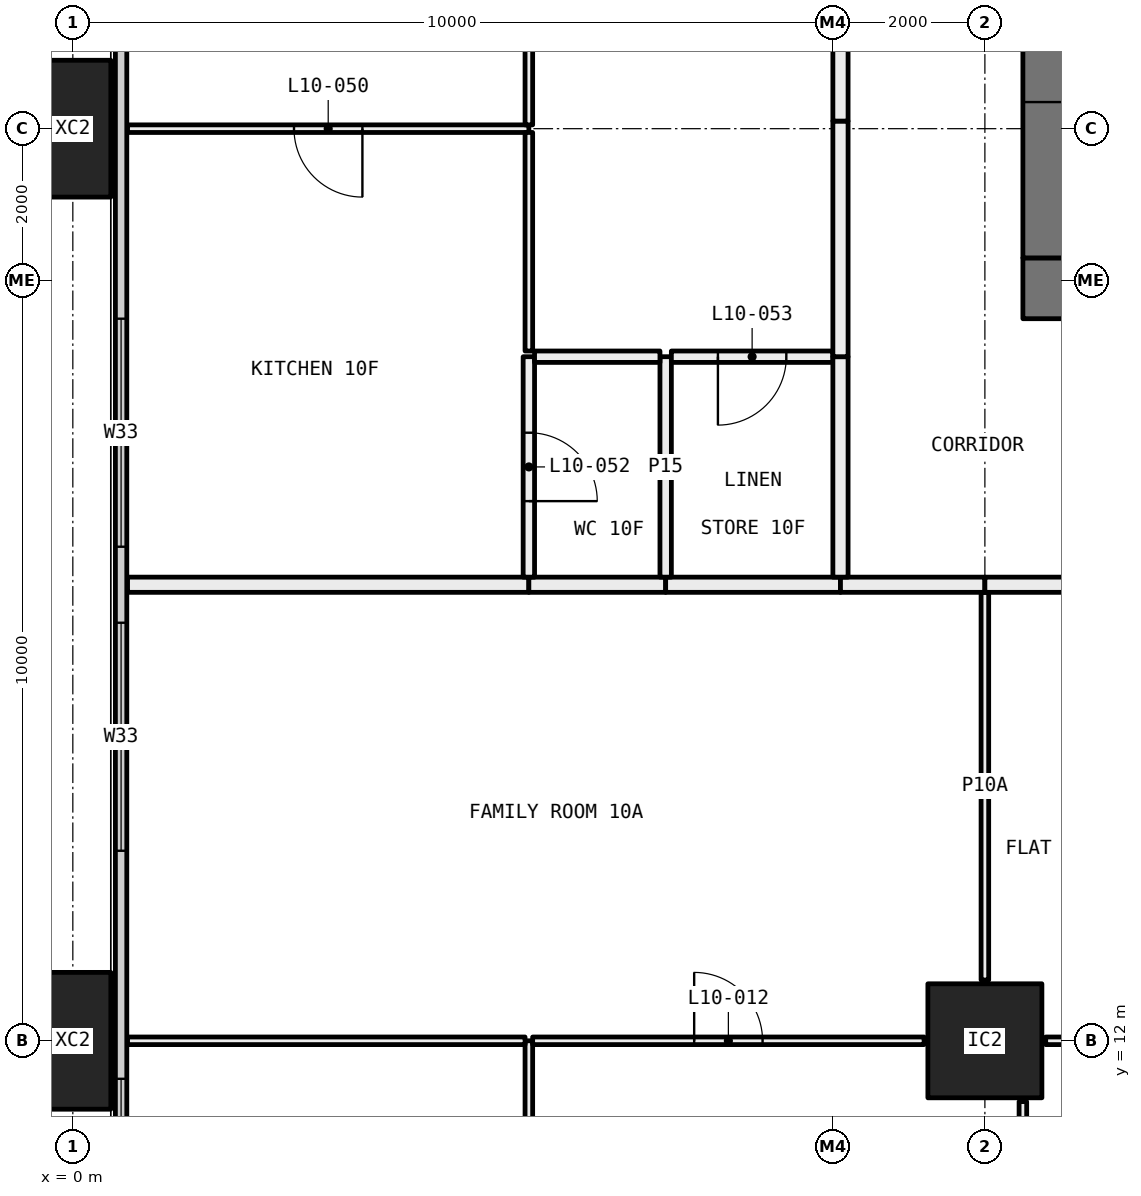
"""IFC4 building model, lengths in metres.
Left out: names, types, materials, properties, quantities, classifications, styles, units other than length and angle.
Written with IfcOpenShell. Run it as: python <this file> out.ifc"""

import sys

from ifc_helpers import new_model, si_unit, direction, frame, frame_2d, origin, origin_2d, place, context, subcontext, project, spatial, rectangle, hollow_rectangle, extrude, element, fill, save


model = new_model("IFC4")
c1 = context("Model", 3, precision=1e-05, world=origin(), true_north=direction((0.0, 1.0)))
c2 = subcontext(c1, "Body", "Model", "MODEL_VIEW")
j1 = project(units=[si_unit("LENGTHUNIT", "METRE"), si_unit("PLANEANGLEUNIT", "RADIAN")], contexts=[c1])
p1 = place(None, origin())
s1 = spatial("IfcSite", under=j1, at=p1, CompositionType="ELEMENT")
p2 = place(p1, origin())
s2 = spatial("IfcBuilding", under=s1, at=p2, CompositionType="ELEMENT")
p3 = place(p2, frame((0.0, 0.0, 47.25)))
s3 = spatial("IfcBuildingStorey", under=s2, at=p3, CompositionType="ELEMENT", Elevation=47.25)
for number, where, z_axis, x_axis in (
    (1, (0.0, 12.0, -0.4), (0.0, 0.0, 1.0), (0.0, 1.0, 0.0)),
    (2, (0.0, 24.0, -0.4), (0.0, 0.0, 1.0), (0.0, 1.0, 0.0)),
):
    element("IfcColumn", number, at=place(p3, frame(where, z_axis=z_axis, x_axis=x_axis)), inside=s3, PredefinedType="COLUMN", context=c2, shape_type="SweptSolid", body=[
        extrude(hollow_rectangle(XDim=1.8, YDim=1.0, WallThickness=0.07, at=origin_2d()), origin(), (0.0, 0.0, 1.0), 3.45),
    ])
p4 = place(p3, frame((12.0, 12.0, 0.0), z_axis=(0.0, 0.0, 1.0), x_axis=(1.0, 0.0, 0.0)))
e3 = element("IfcColumn", 3, at=p4, inside=s3, PredefinedType="COLUMN", context=c2, shape_type="SweptSolid", body=[
    extrude(hollow_rectangle(XDim=1.5, YDim=1.5, WallThickness=0.065, at=origin_2d()), origin(), (0.0, 0.0, 1.0), 3.05),
])
p5 = place(p3, frame((0.635, 6.71, 0.0), z_axis=(0.0, 0.0, 1.0), x_axis=(0.0, 1.0, 0.0)))
e4 = element("IfcWall", 4, at=p5, inside=s3, PredefinedType="ELEMENTEDWALL", context=c2, shape_type="SweptSolid", body=[
    extrude(rectangle(XDim=34.58, YDim=0.15, at=frame_2d((17.29, 0.0))), origin(), (0.0, 0.0, 1.0), 3.05),
])
p6 = place(p5, frame((0.29, 0.0, 0.45)))
e5 = element("IfcOpeningElement", 5, at=p6, cuts=e4, PredefinedType="OPENING", context=c2, shape_type="SweptSolid", body=[
    extrude(rectangle(XDim=4.5, YDim=2.55, at=frame_2d((2.25, 1.275))), frame((0.0, 0.085, 0.0), z_axis=(0.0, -1.0, 0.0), x_axis=(1.0, 0.0, 0.0)), (0.0, 0.0, 1.0), 0.17),
])
p7 = place(p5, frame((7.79, 0.0, 0.45)))
e6 = element("IfcOpeningElement", 6, at=p7, cuts=e4, PredefinedType="OPENING", context=c2, shape_type="SweptSolid", body=[
    extrude(rectangle(XDim=3.0, YDim=2.55, at=frame_2d((1.5, 1.275))), frame((0.0, 0.085, 0.0), z_axis=(0.0, -1.0, 0.0), x_axis=(1.0, 0.0, 0.0)), (0.0, 0.0, 1.0), 0.17),
])
p8 = place(p5, frame((11.79, 0.0, 0.45)))
e7 = element("IfcOpeningElement", 7, at=p8, cuts=e4, PredefinedType="OPENING", context=c2, shape_type="SweptSolid", body=[
    extrude(rectangle(XDim=3.0, YDim=2.55, at=frame_2d((1.5, 1.275))), frame((0.0, 0.085, 0.0), z_axis=(0.0, -1.0, 0.0), x_axis=(1.0, 0.0, 0.0)), (0.0, 0.0, 1.0), 0.17),
])
p9 = place(p5, frame((19.79, 0.0, 0.45)))
e8 = element("IfcOpeningElement", 8, at=p9, cuts=e4, PredefinedType="OPENING", context=c2, shape_type="SweptSolid", body=[
    extrude(rectangle(XDim=3.0, YDim=2.55, at=frame_2d((1.5, 1.275))), frame((0.0, 0.085, 0.0), z_axis=(0.0, -1.0, 0.0), x_axis=(1.0, 0.0, 0.0)), (0.0, 0.0, 1.0), 0.17),
])
p10 = place(p5, frame((23.79, 0.0, 0.45)))
e9 = element("IfcOpeningElement", 9, at=p10, cuts=e4, PredefinedType="OPENING", context=c2, shape_type="SweptSolid", body=[
    extrude(rectangle(XDim=2.0, YDim=2.55, at=frame_2d((1.0, 1.275))), frame((0.0, 0.085, 0.0), z_axis=(0.0, -1.0, 0.0), x_axis=(1.0, 0.0, 0.0)), (0.0, 0.0, 1.0), 0.17),
])
p11 = place(p5, frame((29.79, 0.0, 0.45)))
e10 = element("IfcOpeningElement", 10, at=p11, cuts=e4, PredefinedType="OPENING", context=c2, shape_type="SweptSolid", body=[
    extrude(rectangle(XDim=4.5, YDim=2.55, at=frame_2d((2.25, 1.275))), frame((0.0, 0.085, 0.0), z_axis=(0.0, -1.0, 0.0), x_axis=(1.0, 0.0, 0.0)), (0.0, 0.0, 1.0), 0.17),
])
p12 = place(p3, frame((6.0, 6.72, 0.0), z_axis=(0.0, 0.0, 1.0), x_axis=(0.0, 1.0, 0.0)))
e11 = element("IfcWall", 11, at=p12, inside=s3, PredefinedType="PARTITIONING", context=c2, shape_type="SweptSolid", body=[
    extrude(rectangle(XDim=5.28, YDim=0.1, at=frame_2d((2.64, 0.0))), origin(), (0.0, 0.0, 1.0), 2.45),
])
p13 = place(p12, frame((2.19, 0.0, 0.0)))
e12 = element("IfcOpeningElement", 12, at=p13, cuts=e11, PredefinedType="OPENING", context=c2, shape_type="SweptSolid", body=[
    extrude(rectangle(XDim=0.9, YDim=2.1, at=frame_2d((0.45, 1.05))), frame((0.0, 0.06, 0.0), z_axis=(0.0, -1.0, 0.0), x_axis=(1.0, 0.0, 0.0)), (0.0, 0.0, 1.0), 0.12),
])
p14 = place(p3, frame((5.95, 12.0, 0.0), z_axis=(0.0, 0.0, 1.0), x_axis=(-1.0, 0.0, 0.0)))
e13 = element("IfcWall", 13, at=p14, inside=s3, PredefinedType="PARTITIONING", context=c2, shape_type="SweptSolid", body=[
    extrude(rectangle(XDim=5.23, YDim=0.1, at=frame_2d((2.615, 0.0))), origin(), (0.0, 0.0, 1.0), 2.45),
])
p15 = place(p3, frame((12.5, 6.05, 0.0), z_axis=(0.0, 0.0, 1.0), x_axis=(0.0, 1.0, 0.0)))
e14 = element("IfcWall", 14, at=p15, inside=s3, PredefinedType="PARTITIONING", context=c2, shape_type="SweptSolid", body=[
    extrude(rectangle(XDim=5.15, YDim=0.1, at=frame_2d((2.575, 0.0))), origin(), (0.0, 0.0, 1.0), 3.05),
])
p16 = place(p15, frame((2.125, 0.0, 0.0)))
e15 = element("IfcOpeningElement", 15, at=p16, cuts=e14, PredefinedType="OPENING", context=c2, shape_type="SweptSolid", body=[
    extrude(rectangle(XDim=0.9, YDim=2.1, at=frame_2d((0.45, 1.05))), frame((0.0, 0.06, 0.0), z_axis=(0.0, -1.0, 0.0), x_axis=(1.0, 0.0, 0.0)), (0.0, 0.0, 1.0), 0.12),
])
p17 = place(p3, frame((11.2, 12.0, 0.0), z_axis=(0.0, 0.0, 1.0), x_axis=(-1.0, 0.0, 0.0)))
e16 = element("IfcWall", 16, at=p17, inside=s3, PredefinedType="PARTITIONING", context=c2, shape_type="SweptSolid", body=[
    extrude(rectangle(XDim=5.15, YDim=0.1, at=frame_2d((2.575, 0.0))), origin(), (0.0, 0.0, 1.0), 2.45),
])
p18 = place(p17, frame((2.125, 0.0, 0.0)))
e17 = element("IfcOpeningElement", 17, at=p18, cuts=e16, PredefinedType="OPENING", context=c2, shape_type="SweptSolid", body=[
    extrude(rectangle(XDim=0.9, YDim=2.1, at=frame_2d((0.45, 1.05))), frame((0.0, 0.06, 0.0), z_axis=(0.0, -1.0, 0.0), x_axis=(1.0, 0.0, 0.0)), (0.0, 0.0, 1.0), 0.12),
])
p19 = place(p3, frame((16.5, 12.0, 0.0), z_axis=(0.0, 0.0, 1.0), x_axis=(-1.0, 0.0, 0.0)))
e18 = element("IfcWall", 18, at=p19, inside=s3, PredefinedType="PARTITIONING", context=c2, shape_type="SweptSolid", body=[
    extrude(rectangle(XDim=3.7, YDim=0.1, at=frame_2d((1.85, 0.0))), origin(), (0.0, 0.0, 1.0), 2.45),
])
p20 = place(p19, frame((1.4, 0.0, 0.0)))
e19 = element("IfcOpeningElement", 19, at=p20, cuts=e18, PredefinedType="OPENING", context=c2, shape_type="SweptSolid", body=[
    extrude(rectangle(XDim=0.9, YDim=2.1, at=frame_2d((0.45, 1.05))), frame((0.0, 0.06, 0.0), z_axis=(0.0, -1.0, 0.0), x_axis=(1.0, 0.0, 0.0)), (0.0, 0.0, 1.0), 0.12),
])
p21 = place(p3, frame((12.0, 12.8, 0.0), z_axis=(0.0, 0.0, 1.0), x_axis=(0.0, 1.0, 0.0)))
e20 = element("IfcWall", 20, at=p21, inside=s3, PredefinedType="PARTITIONING", context=c2, shape_type="SweptSolid", body=[
    extrude(rectangle(XDim=5.1, YDim=0.1, at=frame_2d((2.55, 0.0))), origin(), (0.0, 0.0, 1.0), 3.05),
])
p22 = place(p3, frame((6.0, 18.0, 0.0), z_axis=(0.0, 0.0, 1.0), x_axis=(-1.0, 0.0, 0.0)))
e21 = element("IfcWall", 21, at=p22, inside=s3, PredefinedType="PARTITIONING", context=c2, shape_type="SweptSolid", body=[
    extrude(rectangle(XDim=5.28, YDim=0.2, at=frame_2d((2.64, 0.0))), origin(), (0.0, 0.0, 1.0), 3.05),
])
p23 = place(p3, frame((7.8, 18.0, 0.0), z_axis=(0.0, 0.0, 1.0), x_axis=(-1.0, 0.0, 0.0)))
e22 = element("IfcWall", 22, at=p23, inside=s3, PredefinedType="PARTITIONING", context=c2, shape_type="SweptSolid", body=[
    extrude(rectangle(XDim=1.8, YDim=0.2, at=frame_2d((0.9, 0.0))), origin(), (0.0, 0.0, 1.0), 3.05),
])
p24 = place(p3, frame((10.1, 18.0, 0.0), z_axis=(0.0, 0.0, 1.0), x_axis=(-1.0, 0.0, 0.0)))
e23 = element("IfcWall", 23, at=p24, inside=s3, PredefinedType="PARTITIONING", context=c2, shape_type="SweptSolid", body=[
    extrude(rectangle(XDim=2.3, YDim=0.2, at=frame_2d((1.15, 0.0))), origin(), (0.0, 0.0, 1.0), 3.05),
])
p25 = place(p3, frame((12.0, 18.0, 0.0), z_axis=(0.0, 0.0, 1.0), x_axis=(-1.0, 0.0, 0.0)))
e24 = element("IfcWall", 24, at=p25, inside=s3, PredefinedType="PARTITIONING", context=c2, shape_type="SweptSolid", body=[
    extrude(rectangle(XDim=1.9, YDim=0.2, at=frame_2d((0.95, 0.0))), origin(), (0.0, 0.0, 1.0), 3.05),
])
p26 = place(p3, frame((16.5, 18.0, 0.0), z_axis=(0.0, 0.0, 1.0), x_axis=(-1.0, 0.0, 0.0)))
e25 = element("IfcWall", 25, at=p26, inside=s3, PredefinedType="PARTITIONING", context=c2, shape_type="SweptSolid", body=[
    extrude(rectangle(XDim=4.5, YDim=0.2, at=frame_2d((2.25, 0.0))), origin(), (0.0, 0.0, 1.0), 3.05),
])
p27 = place(p26, frame((1.75, 0.0, 0.0)))
e26 = element("IfcOpeningElement", 26, at=p27, cuts=e25, PredefinedType="OPENING", context=c2, shape_type="SweptSolid", body=[
    extrude(rectangle(XDim=1.0, YDim=2.1, at=frame_2d((0.5, 1.05))), frame((0.0, 0.11, 0.0), z_axis=(0.0, -1.0, 0.0), x_axis=(1.0, 0.0, 0.0)), (0.0, 0.0, 1.0), 0.22),
])
p28 = place(p3, frame((6.0, 24.0, 0.0), z_axis=(0.0, 0.0, 1.0), x_axis=(-1.0, 0.0, 0.0)))
e27 = element("IfcWall", 27, at=p28, inside=s3, PredefinedType="PARTITIONING", context=c2, shape_type="SweptSolid", body=[
    extrude(rectangle(XDim=5.28, YDim=0.1, at=frame_2d((2.64, 0.0))), origin(), (0.0, 0.0, 1.0), 2.45),
])
p29 = place(p28, frame((2.19, 0.0, 0.0)))
e28 = element("IfcOpeningElement", 28, at=p29, cuts=e27, PredefinedType="OPENING", context=c2, shape_type="SweptSolid", body=[
    extrude(rectangle(XDim=0.9, YDim=2.1, at=frame_2d((0.45, 1.05))), frame((0.0, 0.06, 0.0), z_axis=(0.0, -1.0, 0.0), x_axis=(1.0, 0.0, 0.0)), (0.0, 0.0, 1.0), 0.12),
])
p30 = place(p3, frame((6.0, 18.1, 0.0), z_axis=(0.0, 0.0, 1.0), x_axis=(0.0, 1.0, 0.0)))
e29 = element("IfcWall", 29, at=p30, inside=s3, PredefinedType="PARTITIONING", context=c2, shape_type="SweptSolid", body=[
    extrude(rectangle(XDim=2.9, YDim=0.15, at=frame_2d((1.45, 0.0))), origin(), (0.0, 0.0, 1.0), 3.05),
])
p31 = place(p30, frame((1.0, 0.0, 0.0)))
e30 = element("IfcOpeningElement", 30, at=p31, cuts=e29, PredefinedType="OPENING", context=c2, shape_type="SweptSolid", body=[
    extrude(rectangle(XDim=0.9, YDim=2.1, at=frame_2d((0.45, 1.05))), frame((0.0, 0.085, 0.0), z_axis=(0.0, -1.0, 0.0), x_axis=(1.0, 0.0, 0.0)), (0.0, 0.0, 1.0), 0.17),
])
p32 = place(p3, frame((6.0, 21.075, 0.0), z_axis=(0.0, 0.0, 1.0), x_axis=(0.0, 1.0, 0.0)))
e31 = element("IfcWall", 31, at=p32, inside=s3, PredefinedType="PARTITIONING", context=c2, shape_type="SweptSolid", body=[
    extrude(rectangle(XDim=2.875, YDim=0.1, at=frame_2d((1.438, 0.0))), origin(), (0.0, 0.0, 1.0), 2.45),
])
p33 = place(p3, frame((6.0, 24.05, 0.0), z_axis=(0.0, 0.0, 1.0), x_axis=(0.0, 1.0, 0.0)))
e32 = element("IfcWall", 32, at=p33, inside=s3, PredefinedType="PARTITIONING", context=c2, shape_type="SweptSolid", body=[
    extrude(rectangle(XDim=8.95, YDim=0.1, at=frame_2d((4.475, 0.0))), origin(), (0.0, 0.0, 1.0), 2.45),
])
p34 = place(p3, frame((7.8, 18.1, 0.0), z_axis=(0.0, 0.0, 1.0), x_axis=(0.0, 1.0, 0.0)))
e33 = element("IfcWall", 33, at=p34, inside=s3, PredefinedType="PARTITIONING", context=c2, shape_type="SweptSolid", body=[
    extrude(rectangle(XDim=2.9, YDim=0.15, at=frame_2d((1.45, 0.0))), origin(), (0.0, 0.0, 1.0), 3.05),
])
p35 = place(p3, frame((7.725, 21.0, 0.0), z_axis=(0.0, 0.0, 1.0), x_axis=(-1.0, 0.0, 0.0)))
e34 = element("IfcWall", 34, at=p35, inside=s3, PredefinedType="PARTITIONING", context=c2, shape_type="SweptSolid", body=[
    extrude(rectangle(XDim=1.65, YDim=0.15, at=frame_2d((0.825, 0.0))), origin(), (0.0, 0.0, 1.0), 3.05),
])
p36 = place(p3, frame((10.0, 21.0, 0.0), z_axis=(0.0, 0.0, 1.0), x_axis=(-1.0, 0.0, 0.0)))
e35 = element("IfcWall", 35, at=p36, inside=s3, PredefinedType="PARTITIONING", context=c2, shape_type="SweptSolid", body=[
    extrude(rectangle(XDim=2.125, YDim=0.15, at=frame_2d((1.062, 0.0))), origin(), (0.0, 0.0, 1.0), 3.05),
])
p37 = place(p36, frame((0.613, 0.0, 0.0)))
e36 = element("IfcOpeningElement", 36, at=p37, cuts=e35, PredefinedType="OPENING", context=c2, shape_type="SweptSolid", body=[
    extrude(rectangle(XDim=0.9, YDim=2.1, at=frame_2d((0.45, 1.05))), frame((0.0, 0.085, 0.0), z_axis=(0.0, -1.0, 0.0), x_axis=(1.0, 0.0, 0.0)), (0.0, 0.0, 1.0), 0.17),
])
p38 = place(p3, frame((10.1, 18.1, 0.0), z_axis=(0.0, 0.0, 1.0), x_axis=(0.0, 1.0, 0.0)))
e37 = element("IfcWall", 37, at=p38, inside=s3, PredefinedType="PARTITIONING", context=c2, shape_type="SweptSolid", body=[
    extrude(rectangle(XDim=2.9, YDim=0.2, at=frame_2d((1.45, 0.0))), origin(), (0.0, 0.0, 1.0), 3.05),
])
p39 = place(p3, frame((10.1, 21.0, 0.0), z_axis=(0.0, 0.0, 1.0), x_axis=(0.0, 1.0, 0.0)))
e38 = element("IfcWall", 38, at=p39, inside=s3, PredefinedType="PARTITIONING", context=c2, shape_type="SweptSolid", body=[
    extrude(rectangle(XDim=3.1, YDim=0.2, at=frame_2d((1.55, 0.0))), origin(), (0.0, 0.0, 1.0), 2.45),
])
p40 = place(p3, frame((10.1, 24.1, 0.0), z_axis=(0.0, 0.0, 1.0), x_axis=(0.0, 1.0, 0.0)))
e39 = element("IfcWall", 39, at=p40, inside=s3, PredefinedType="PARTITIONING", context=c2, shape_type="SweptSolid", body=[
    extrude(rectangle(XDim=8.9, YDim=0.2, at=frame_2d((4.45, 0.0))), origin(), (0.0, 0.0, 1.0), 3.05),
])
p41 = place(p3, frame((12.5, 21.9, 0.0), z_axis=(0.0, 0.0, 1.0), x_axis=(1.0, 0.0, 0.0)))
e40 = element("IfcWall", 40, at=p41, inside=s3, PredefinedType="SHEAR", context=c2, shape_type="SweptSolid", body=[
    extrude(rectangle(XDim=11.0, YDim=0.8, at=frame_2d((5.5, 0.0))), origin(), (0.0, 0.0, 1.0), 3.05),
])
p42 = place(p3, frame((12.9, 22.3, 0.0), z_axis=(0.0, 0.0, 1.0), x_axis=(0.0, 1.0, 0.0)))
e41 = element("IfcWall", 41, at=p42, inside=s3, PredefinedType="SHEAR", context=c2, shape_type="SweptSolid", body=[
    extrude(rectangle(XDim=15.4, YDim=0.8, at=frame_2d((7.7, 0.0))), origin(), (0.0, 0.0, 1.0), 3.05),
])
p43 = place(p42, frame((8.15, 0.0, 0.0)))
e42 = element("IfcOpeningElement", 42, at=p43, cuts=e41, PredefinedType="OPENING", context=c2, shape_type="SweptSolid", body=[
    extrude(rectangle(XDim=1.6, YDim=2.1, at=frame_2d((0.8, 1.05))), frame((0.0, 0.41, 0.0), z_axis=(0.0, -1.0, 0.0), x_axis=(1.0, 0.0, 0.0)), (0.0, 0.0, 1.0), 0.82),
])
p44 = place(p42, frame((2.05, 0.0, 0.0)))
e43 = element("IfcOpeningElement", 43, at=p44, cuts=e41, PredefinedType="OPENING", context=c2, shape_type="SweptSolid", body=[
    extrude(rectangle(XDim=1.0, YDim=2.1, at=frame_2d((0.5, 1.05))), frame((0.0, 0.41, 0.0), z_axis=(0.0, -1.0, 0.0), x_axis=(1.0, 0.0, 0.0)), (0.0, 0.0, 1.0), 0.82),
])
p45 = place(p6, origin())
e44 = element("IfcWindow", 44, at=p45, inside=s3, PartitioningType="SINGLE_PANEL", PredefinedType="WINDOW", context=c2, shape_type="SweptSolid", body=[
    extrude(rectangle(XDim=4.5, YDim=2.55, at=frame_2d((2.25, 1.275))), frame((0.0, 0.03, 0.0), z_axis=(0.0, -1.0, 0.0), x_axis=(1.0, 0.0, 0.0)), (0.0, 0.0, 1.0), 0.06),
])
fill(e5, e44)
p46 = place(p7, origin())
e45 = element("IfcWindow", 45, at=p46, inside=s3, PartitioningType="SINGLE_PANEL", PredefinedType="WINDOW", context=c2, shape_type="SweptSolid", body=[
    extrude(rectangle(XDim=3.0, YDim=2.55, at=frame_2d((1.5, 1.275))), frame((0.0, 0.03, 0.0), z_axis=(0.0, -1.0, 0.0), x_axis=(1.0, 0.0, 0.0)), (0.0, 0.0, 1.0), 0.06),
])
fill(e6, e45)
p47 = place(p8, origin())
e46 = element("IfcWindow", 46, at=p47, inside=s3, PartitioningType="SINGLE_PANEL", PredefinedType="WINDOW", context=c2, shape_type="SweptSolid", body=[
    extrude(rectangle(XDim=3.0, YDim=2.55, at=frame_2d((1.5, 1.275))), frame((0.0, 0.03, 0.0), z_axis=(0.0, -1.0, 0.0), x_axis=(1.0, 0.0, 0.0)), (0.0, 0.0, 1.0), 0.06),
])
fill(e7, e46)
p48 = place(p18, frame((0.9, 0.0, 0.0), x_axis=(-1.0, 0.0, 0.0)))
e47 = element("IfcDoor", 47, at=p48, inside=s3, OperationType="SINGLE_SWING_RIGHT", PredefinedType="DOOR", context=c2, shape_type="SweptSolid", body=[
    extrude(rectangle(XDim=0.9, YDim=2.1, at=frame_2d((0.45, 1.05))), frame((0.0, 0.025, 0.0), z_axis=(0.0, -1.0, 0.0), x_axis=(1.0, 0.0, 0.0)), (0.0, 0.0, 1.0), 0.05),
])
fill(e17, e47)
p49 = place(p29, origin())
e48 = element("IfcDoor", 48, at=p49, inside=s3, OperationType="SINGLE_SWING_RIGHT", PredefinedType="DOOR", context=c2, shape_type="SweptSolid", body=[
    extrude(rectangle(XDim=0.9, YDim=2.1, at=frame_2d((0.45, 1.05))), frame((0.0, 0.025, 0.0), z_axis=(0.0, -1.0, 0.0), x_axis=(1.0, 0.0, 0.0)), (0.0, 0.0, 1.0), 0.05),
])
fill(e28, e48)
p50 = place(p31, frame((0.9, 0.0, 0.0), x_axis=(-1.0, 0.0, 0.0)))
e49 = element("IfcDoor", 49, at=p50, inside=s3, OperationType="SINGLE_SWING_LEFT", PredefinedType="DOOR", context=c2, shape_type="SweptSolid", body=[
    extrude(rectangle(XDim=0.9, YDim=2.1, at=frame_2d((0.45, 1.05))), frame((0.0, 0.025, 0.0), z_axis=(0.0, -1.0, 0.0), x_axis=(1.0, 0.0, 0.0)), (0.0, 0.0, 1.0), 0.05),
])
fill(e30, e49)
p51 = place(p37, origin())
e50 = element("IfcDoor", 50, at=p51, inside=s3, OperationType="SINGLE_SWING_LEFT", PredefinedType="DOOR", context=c2, shape_type="SweptSolid", body=[
    extrude(rectangle(XDim=0.9, YDim=2.1, at=frame_2d((0.45, 1.05))), frame((0.0, 0.025, 0.0), z_axis=(0.0, -1.0, 0.0), x_axis=(1.0, 0.0, 0.0)), (0.0, 0.0, 1.0), 0.05),
])
fill(e36, e50)
p52 = place(p44, frame((1.0, 0.0, 0.0), x_axis=(-1.0, 0.0, 0.0)))
e51 = element("IfcDoor", 51, at=p52, inside=s3, OperationType="SINGLE_SWING_RIGHT", PredefinedType="DOOR", context=c2, shape_type="SweptSolid", body=[
    extrude(rectangle(XDim=1.0, YDim=2.1, at=frame_2d((0.5, 1.05))), frame((0.0, 0.025, 0.0), z_axis=(0.0, -1.0, 0.0), x_axis=(1.0, 0.0, 0.0)), (0.0, 0.0, 1.0), 0.05),
])
fill(e43, e51)
save(model, sys.argv[1])
